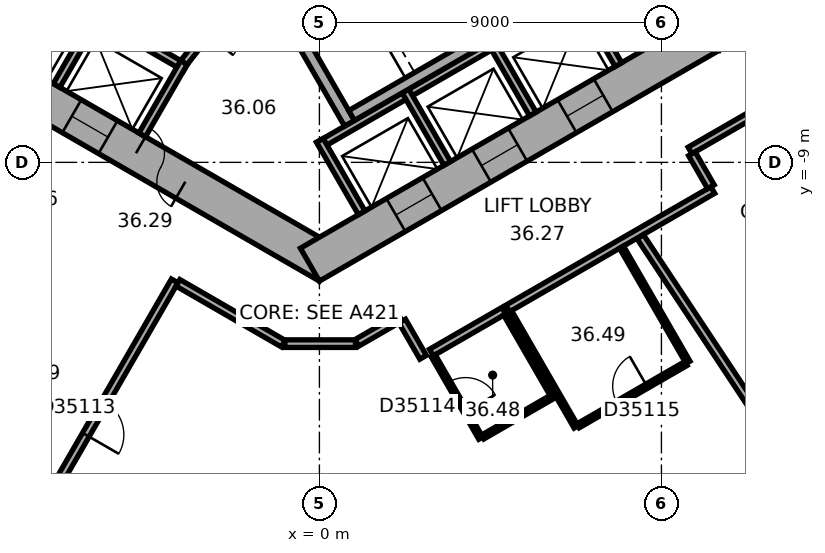
"""IFC4 building model, lengths in metres.
Left out: names, types, materials, properties, quantities, classifications, styles, units other than length and angle.
Written with IfcOpenShell. Run it as: python <this file> out.ifc"""

import sys

from ifc_helpers import new_model, si_unit, direction, frame, frame_2d, origin, place, context, subcontext, project, spatial, rectangle, extrude, element, fill, save


model = new_model("IFC4")
c1 = context("Model", 3, precision=1e-05, world=origin(), true_north=direction((0.0, 1.0)))
c2 = subcontext(c1, "Body", "Model", "MODEL_VIEW")
j1 = project(units=[si_unit("LENGTHUNIT", "METRE"), si_unit("PLANEANGLEUNIT", "RADIAN")], contexts=[c1])
p1 = place(None, origin())
s1 = spatial("IfcSite", under=j1, at=p1, CompositionType="ELEMENT")
p2 = place(p1, origin())
s2 = spatial("IfcBuilding", under=s1, at=p2, CompositionType="ELEMENT")
p3 = place(p2, frame((0.0, 0.0, 150.3)))
s3 = spatial("IfcBuildingStorey", under=s2, at=p3, CompositionType="ELEMENT", Elevation=150.3)
p4 = place(p3, frame((-10.25, -5.629, 0.0), z_axis=(0.0, 0.0, 1.0), x_axis=(0.866022616891, -0.50000482701, 0.0)))
e1 = element("IfcWall", 1, at=p4, inside=s3, PredefinedType="SHEAR", context=c2, shape_type="SweptSolid", body=[
    extrude(rectangle(XDim=12.125, YDim=1.0, at=frame_2d((6.062, 0.0))), origin(), (0.0, 0.0, 1.0), 3.7),
])
p5 = place(p4, frame((6.262, 0.0, 0.0)))
e2 = element("IfcOpeningElement", 2, at=p5, cuts=e1, PredefinedType="OPENING", context=c2, shape_type="SweptSolid", body=[
    extrude(rectangle(XDim=1.5, YDim=2.1, at=frame_2d((0.75, 1.05))), frame((0.0, 0.51, 0.0), z_axis=(0.0, -1.0, 0.0), x_axis=(1.0, 0.0, 0.0)), (0.0, 0.0, 1.0), 1.02),
])
p6 = place(p4, frame((1.712, 0.0, 0.0)))
e3 = element("IfcOpeningElement", 3, at=p6, cuts=e1, PredefinedType="OPENING", context=c2, shape_type="SweptSolid", body=[
    extrude(rectangle(XDim=1.1, YDim=2.1, at=frame_2d((0.55, 1.05))), frame((0.0, 0.51, 0.0), z_axis=(0.0, -1.0, 0.0), x_axis=(1.0, 0.0, 0.0)), (0.0, 0.0, 1.0), 1.02),
])
p7 = place(p4, frame((4.312, 0.0, 0.0)))
e4 = element("IfcOpeningElement", 4, at=p7, cuts=e1, PredefinedType="OPENING", context=c2, shape_type="SweptSolid", body=[
    extrude(rectangle(XDim=1.1, YDim=2.1, at=frame_2d((0.55, 1.05))), frame((0.0, 0.51, 0.0), z_axis=(0.0, -1.0, 0.0), x_axis=(1.0, 0.0, 0.0)), (0.0, 0.0, 1.0), 1.02),
])
p8 = place(p3, frame((-0.25, -11.691, 0.0), z_axis=(0.0, 0.0, 1.0), x_axis=(0.866022616891, 0.50000482701, 0.0)))
e5 = element("IfcWall", 5, at=p8, inside=s3, PredefinedType="SHEAR", context=c2, shape_type="SweptSolid", body=[
    extrude(rectangle(XDim=12.125, YDim=1.0, at=frame_2d((6.062, 0.0))), origin(), (0.0, 0.0, 1.0), 3.7),
])
p9 = place(p8, frame((2.612, 0.0, 0.0)))
e6 = element("IfcOpeningElement", 6, at=p9, cuts=e5, PredefinedType="OPENING", context=c2, shape_type="SweptSolid", body=[
    extrude(rectangle(XDim=1.1, YDim=2.1, at=frame_2d((0.55, 1.05))), frame((0.0, 0.51, 0.0), z_axis=(0.0, -1.0, 0.0), x_axis=(1.0, 0.0, 0.0)), (0.0, 0.0, 1.0), 1.02),
])
p10 = place(p8, frame((5.212, 0.0, 0.0)))
e7 = element("IfcOpeningElement", 7, at=p10, cuts=e5, PredefinedType="OPENING", context=c2, shape_type="SweptSolid", body=[
    extrude(rectangle(XDim=1.1, YDim=2.1, at=frame_2d((0.55, 1.05))), frame((0.0, 0.51, 0.0), z_axis=(0.0, -1.0, 0.0), x_axis=(1.0, 0.0, 0.0)), (0.0, 0.0, 1.0), 1.02),
])
p11 = place(p8, frame((7.812, 0.0, 0.0)))
e8 = element("IfcOpeningElement", 8, at=p11, cuts=e5, PredefinedType="OPENING", context=c2, shape_type="SweptSolid", body=[
    extrude(rectangle(XDim=1.1, YDim=2.1, at=frame_2d((0.55, 1.05))), frame((0.0, 0.51, 0.0), z_axis=(0.0, -1.0, 0.0), x_axis=(1.0, 0.0, 0.0)), (0.0, 0.0, 1.0), 1.02),
])
p12 = place(p3, frame((-18.789, -14.267, 0.0), z_axis=(0.0, 0.0, 1.0), x_axis=(0.866023315909, -0.500003616288, 0.0)))
e9 = element("IfcWall", 9, at=p12, inside=s3, PredefinedType="STANDARD", context=c2, shape_type="SweptSolid", body=[
    extrude(rectangle(XDim=20.044, YDim=0.2, at=frame_2d((10.022, 0.0))), origin(), (0.0, 0.0, 1.0), 3.7),
])
p13 = place(p12, frame((1.314, 0.0, 0.9)))
e10 = element("IfcOpeningElement", 10, at=p13, cuts=e9, PredefinedType="OPENING", context=c2, shape_type="SweptSolid", body=[
    extrude(rectangle(XDim=2.4, YDim=2.0, at=frame_2d((1.2, 1.0))), frame((0.0, 0.11, 0.0), z_axis=(0.0, -1.0, 0.0), x_axis=(1.0, 0.0, 0.0)), (0.0, 0.0, 1.0), 0.22),
])
p14 = place(p12, frame((5.069, 0.0, 0.9)))
e11 = element("IfcOpeningElement", 11, at=p14, cuts=e9, PredefinedType="OPENING", context=c2, shape_type="SweptSolid", body=[
    extrude(rectangle(XDim=2.4, YDim=2.0, at=frame_2d((1.2, 1.0))), frame((0.0, 0.11, 0.0), z_axis=(0.0, -1.0, 0.0), x_axis=(1.0, 0.0, 0.0)), (0.0, 0.0, 1.0), 0.22),
])
p15 = place(p12, frame((8.823, 0.0, 0.9)))
e12 = element("IfcOpeningElement", 12, at=p15, cuts=e9, PredefinedType="OPENING", context=c2, shape_type="SweptSolid", body=[
    extrude(rectangle(XDim=2.4, YDim=2.0, at=frame_2d((1.2, 1.0))), frame((0.0, 0.11, 0.0), z_axis=(0.0, -1.0, 0.0), x_axis=(1.0, 0.0, 0.0)), (0.0, 0.0, 1.0), 0.22),
])
p16 = place(p12, frame((12.577, 0.0, 0.9)))
e13 = element("IfcOpeningElement", 13, at=p16, cuts=e9, PredefinedType="OPENING", context=c2, shape_type="SweptSolid", body=[
    extrude(rectangle(XDim=2.4, YDim=2.0, at=frame_2d((1.2, 1.0))), frame((0.0, 0.11, 0.0), z_axis=(0.0, -1.0, 0.0), x_axis=(1.0, 0.0, 0.0)), (0.0, 0.0, 1.0), 0.22),
])
p17 = place(p12, frame((16.331, 0.0, 0.9)))
e14 = element("IfcOpeningElement", 14, at=p17, cuts=e9, PredefinedType="OPENING", context=c2, shape_type="SweptSolid", body=[
    extrude(rectangle(XDim=2.4, YDim=2.0, at=frame_2d((1.2, 1.0))), frame((0.0, 0.11, 0.0), z_axis=(0.0, -1.0, 0.0), x_axis=(1.0, 0.0, 0.0)), (0.0, 0.0, 1.0), 0.22),
])
p18 = place(p3, frame((2.911, -24.156, 0.0), z_axis=(0.0, 0.0, 1.0), x_axis=(0.833882163564, 0.551942512668, 0.0)))
e15 = element("IfcWall", 15, at=p18, inside=s3, PredefinedType="STANDARD", context=c2, shape_type="SweptSolid", body=[
    extrude(rectangle(XDim=20.044, YDim=0.2, at=frame_2d((10.022, 0.0))), origin(), (0.0, 0.0, 1.0), 3.7),
])
p19 = place(p18, frame((1.313, 0.0, 0.9)))
e16 = element("IfcOpeningElement", 16, at=p19, cuts=e15, PredefinedType="OPENING", context=c2, shape_type="SweptSolid", body=[
    extrude(rectangle(XDim=2.4, YDim=2.0, at=frame_2d((1.2, 1.0))), frame((0.0, 0.11, 0.0), z_axis=(0.0, -1.0, 0.0), x_axis=(1.0, 0.0, 0.0)), (0.0, 0.0, 1.0), 0.22),
])
p20 = place(p18, frame((5.067, 0.0, 0.9)))
e17 = element("IfcOpeningElement", 17, at=p20, cuts=e15, PredefinedType="OPENING", context=c2, shape_type="SweptSolid", body=[
    extrude(rectangle(XDim=2.4, YDim=2.0, at=frame_2d((1.2, 1.0))), frame((0.0, 0.11, 0.0), z_axis=(0.0, -1.0, 0.0), x_axis=(1.0, 0.0, 0.0)), (0.0, 0.0, 1.0), 0.22),
])
p21 = place(p18, frame((8.821, 0.0, 0.9)))
e18 = element("IfcOpeningElement", 18, at=p21, cuts=e15, PredefinedType="OPENING", context=c2, shape_type="SweptSolid", body=[
    extrude(rectangle(XDim=2.4, YDim=2.0, at=frame_2d((1.2, 1.0))), frame((0.0, 0.11, 0.0), z_axis=(0.0, -1.0, 0.0), x_axis=(1.0, 0.0, 0.0)), (0.0, 0.0, 1.0), 0.22),
])
p22 = place(p18, frame((12.575, 0.0, 0.9)))
e19 = element("IfcOpeningElement", 19, at=p22, cuts=e15, PredefinedType="OPENING", context=c2, shape_type="SweptSolid", body=[
    extrude(rectangle(XDim=2.4, YDim=2.0, at=frame_2d((1.2, 1.0))), frame((0.0, 0.11, 0.0), z_axis=(0.0, -1.0, 0.0), x_axis=(1.0, 0.0, 0.0)), (0.0, 0.0, 1.0), 0.22),
])
p23 = place(p18, frame((16.329, 0.0, 0.9)))
e20 = element("IfcOpeningElement", 20, at=p23, cuts=e15, PredefinedType="OPENING", context=c2, shape_type="SweptSolid", body=[
    extrude(rectangle(XDim=2.4, YDim=2.0, at=frame_2d((1.2, 1.0))), frame((0.0, 0.11, 0.0), z_axis=(0.0, -1.0, 0.0), x_axis=(1.0, 0.0, 0.0)), (0.0, 0.0, 1.0), 0.22),
])
p24 = place(p3, frame((-8.203, -3.809, 0.0), z_axis=(0.0, 0.0, 1.0), x_axis=(0.866028230842, -0.499995103361, 0.0)))
e21 = element("IfcWall", 21, at=p24, inside=s3, PredefinedType="PARTITIONING", context=c2, shape_type="SweptSolid", body=[
    extrude(rectangle(XDim=5.4, YDim=0.2, at=frame_2d((2.7, 0.0))), origin(), (0.0, 0.0, 1.0), 3.42),
])
p25 = place(p3, frame((-5.815, -5.072, 0.0), z_axis=(0.0, 0.0, 1.0), x_axis=(-0.499946605688, -0.86605622881, 0.0)))
e22 = element("IfcWall", 22, at=p25, inside=s3, PredefinedType="PARTITIONING", context=c2, shape_type="SweptSolid", body=[
    extrude(rectangle(XDim=2.2, YDim=0.2, at=frame_2d((1.1, 0.0))), origin(), (0.0, 0.0, 1.0), 3.42),
])
p26 = place(p3, frame((-3.563, -6.372, 0.0), z_axis=(0.0, 0.0, 1.0), x_axis=(-0.499994660107, -0.866028486751, 0.0)))
e23 = element("IfcWall", 23, at=p26, inside=s3, PredefinedType="PARTITIONING", context=c2, shape_type="SweptSolid", body=[
    extrude(rectangle(XDim=2.2, YDim=0.2, at=frame_2d((1.1, 0.0))), origin(), (0.0, 0.0, 1.0), 3.42),
])
p27 = place(p3, frame((-0.024, -8.559, 0.0), z_axis=(0.0, 0.0, 1.0), x_axis=(0.866026010844, 0.49999894854, 0.0)))
e24 = element("IfcWall", 24, at=p27, inside=s3, PredefinedType="PARTITIONING", context=c2, shape_type="SweptSolid", body=[
    extrude(rectangle(XDim=8.0, YDim=0.2, at=frame_2d((4.0, 0.0))), origin(), (0.0, 0.0, 1.0), 3.42),
])
for number, where, z_axis, x_axis in (
    (25, (0.013, -8.422, 0.0), (0.0, 0.0, 1.0), (0.5, -0.866, 0.0)),
    (26, (2.264, -7.122, 0.0), (0.0, 0.0, 1.0), (0.5, -0.866, 0.0)),
    (27, (4.516, -5.822, 0.0), (0.0, 0.0, 1.0), (0.5, -0.866, 0.0)),
    (28, (6.768, -4.522, 0.0), (0.0, 0.0, 1.0), (0.5, -0.866, 0.0)),
):
    element("IfcWall", number, at=place(p3, frame(where, z_axis=z_axis, x_axis=x_axis)), inside=s3, PredefinedType="PARTITIONING", context=c2, shape_type="SweptSolid", body=[
        extrude(rectangle(XDim=2.2, YDim=0.2, at=frame_2d((1.1, 0.0))), origin(), (0.0, 0.0, 1.0), 3.42),
    ])
p28 = place(p3, frame((-1.558, -3.902, 0.0), z_axis=(0.0, 0.0, 1.0), x_axis=(0.499977259774, -0.866038532462, 0.0)))
e29 = element("IfcWall", 29, at=p28, inside=s3, PredefinedType="SHEAR", context=c2, shape_type="SweptSolid", body=[
    extrude(rectangle(XDim=4.7, YDim=0.3, at=frame_2d((2.35, 0.0))), origin(), (0.0, 0.0, 1.0), 3.42),
])
p29 = place(p28, frame((0.8, 0.0, 0.0)))
e30 = element("IfcOpeningElement", 30, at=p29, cuts=e29, PredefinedType="OPENING", context=c2, shape_type="SweptSolid", body=[
    extrude(rectangle(XDim=1.2, YDim=2.1, at=frame_2d((0.6, 1.05))), frame((0.0, 0.16, 0.0), z_axis=(0.0, -1.0, 0.0), x_axis=(1.0, 0.0, 0.0)), (0.0, 0.0, 1.0), 0.32),
])
p30 = place(p3, frame((0.847, -7.767, 0.0), z_axis=(0.0, 0.0, 1.0), x_axis=(0.866027801685, 0.499995846692, 0.0)))
e31 = element("IfcWall", 31, at=p30, inside=s3, PredefinedType="SHEAR", context=c2, shape_type="SweptSolid", body=[
    extrude(rectangle(XDim=7.06, YDim=0.3, at=frame_2d((3.53, 0.0))), origin(), (0.0, 0.0, 1.0), 3.42),
])
p31 = place(p3, frame((-1.712, -4.008, 0.0), z_axis=(0.0, 0.0, 1.0), x_axis=(-0.616549420702, -0.787316208287, 0.0)))
e32 = element("IfcWall", 32, at=p31, inside=s3, PredefinedType="PARTITIONING", context=c2, shape_type="SweptSolid", body=[
    extrude(rectangle(XDim=3.002, YDim=0.2, at=frame_2d((1.501, 0.0))), origin(), (0.0, 0.0, 1.0), 3.42),
])
p32 = place(p31, frame((1.15, 0.0, 0.0)))
e33 = element("IfcOpeningElement", 33, at=p32, cuts=e32, PredefinedType="OPENING", context=c2, shape_type="SweptSolid", body=[
    extrude(rectangle(XDim=0.9, YDim=2.1, at=frame_2d((0.45, 1.05))), frame((0.0, 0.11, 0.0), z_axis=(0.0, -1.0, 0.0), x_axis=(1.0, 0.0, 0.0)), (0.0, 0.0, 1.0), 0.22),
])
p33 = place(p3, frame((-7.984, -19.351, 0.0), z_axis=(0.0, 0.0, 1.0), x_axis=(0.500010139422, 0.866019549707, 0.0)))
e34 = element("IfcWall", 34, at=p33, inside=s3, PredefinedType="PARTITIONING", context=c2, shape_type="SweptSolid", body=[
    extrude(rectangle(XDim=8.35, YDim=0.2, at=frame_2d((4.175, 0.0))), origin(), (0.0, 0.0, 1.0), 3.42),
])
p34 = place(p33, frame((3.675, 0.0, 0.0)))
e35 = element("IfcOpeningElement", 35, at=p34, cuts=e34, PredefinedType="OPENING", context=c2, shape_type="SweptSolid", body=[
    extrude(rectangle(XDim=1.0, YDim=2.1, at=frame_2d((0.5, 1.05))), frame((0.0, 0.11, 0.0), z_axis=(0.0, -1.0, 0.0), x_axis=(1.0, 0.0, 0.0)), (0.0, 0.0, 1.0), 0.22),
])
p35 = place(p3, frame((-3.722, -12.169, 0.0), z_axis=(0.0, 0.0, 1.0), x_axis=(0.866033163891, -0.499986558861, 0.0)))
e36 = element("IfcWall", 36, at=p35, inside=s3, PredefinedType="PARTITIONING", context=c2, shape_type="SweptSolid", body=[
    extrude(rectangle(XDim=3.201, YDim=0.2, at=frame_2d((1.6, 0.0))), origin(), (0.0, 0.0, 1.0), 3.42),
])
p36 = place(p3, frame((-0.91, -13.77, 0.0), z_axis=(0.0, 0.0, 1.0), x_axis=(1.0, 0.0, 0.0)))
e37 = element("IfcWall", 37, at=p36, inside=s3, PredefinedType="PARTITIONING", context=c2, shape_type="SweptSolid", body=[
    extrude(rectangle(XDim=1.86, YDim=0.2, at=frame_2d((0.93, 0.0))), origin(), (0.0, 0.0, 1.0), 3.42),
])
p37 = place(p3, frame((0.985, -13.75, 0.0), z_axis=(0.0, 0.0, 1.0), x_axis=(0.866028661061, 0.499994358189, 0.0)))
e38 = element("IfcWall", 38, at=p37, inside=s3, PredefinedType="PARTITIONING", context=c2, shape_type="SweptSolid", body=[
    extrude(rectangle(XDim=1.321, YDim=0.2, at=frame_2d((0.661, 0.0))), origin(), (0.0, 0.0, 1.0), 3.42),
])
p38 = place(p3, frame((2.179, -13.176, 0.0), z_axis=(0.0, 0.0, 1.0), x_axis=(0.499978356969, -0.866037899034, 0.0)))
e39 = element("IfcWall", 39, at=p38, inside=s3, PredefinedType="PARTITIONING", context=c2, shape_type="SweptSolid", body=[
    extrude(rectangle(XDim=1.101, YDim=0.2, at=frame_2d((0.551, 0.0))), origin(), (0.0, 0.0, 1.0), 3.42),
])
p39 = place(p3, frame((2.946, -14.004, 0.0), z_axis=(0.0, 0.0, 1.0), x_axis=(0.866008176907, 0.50002983664, 0.0)))
e40 = element("IfcWall", 40, at=p39, inside=s3, PredefinedType="PARTITIONING", context=c2, shape_type="SweptSolid", body=[
    extrude(rectangle(XDim=2.2, YDim=0.2, at=frame_2d((1.1, 0.0))), origin(), (0.0, 0.0, 1.0), 3.42),
])
p40 = place(p3, frame((4.246, -16.256, 0.0), z_axis=(0.0, 0.0, 1.0), x_axis=(-0.499961950354, 0.866047370643, 0.0)))
e41 = element("IfcWall", 41, at=p40, inside=s3, PredefinedType="PARTITIONING", context=c2, shape_type="SweptSolid", body=[
    extrude(rectangle(XDim=2.5, YDim=0.12, at=frame_2d((1.25, 0.0))), origin(), (0.0, 0.0, 1.0), 3.42),
])
p41 = place(p40, frame((0.8, 0.0, 0.0)))
e42 = element("IfcOpeningElement", 42, at=p41, cuts=e41, PredefinedType="OPENING", context=c2, shape_type="SweptSolid", body=[
    extrude(rectangle(XDim=0.9, YDim=2.1, at=frame_2d((0.45, 1.05))), frame((0.0, 0.07, 0.0), z_axis=(0.0, -1.0, 0.0), x_axis=(1.0, 0.0, 0.0)), (0.0, 0.0, 1.0), 0.14),
])
p42 = place(p3, frame((4.901, -12.991, 0.0), z_axis=(0.0, 0.0, 1.0), x_axis=(0.500004234368, -0.866022959057, 0.0)))
e43 = element("IfcWall", 43, at=p42, inside=s3, PredefinedType="PARTITIONING", context=c2, shape_type="SweptSolid", body=[
    extrude(rectangle(XDim=2.5, YDim=0.12, at=frame_2d((1.25, 0.0))), origin(), (0.0, 0.0, 1.0), 3.42),
])
p43 = place(p3, frame((4.955, -12.844, 0.0), z_axis=(0.0, 0.0, 1.0), x_axis=(0.86602379309, 0.500002789795, 0.0)))
e44 = element("IfcWall", 44, at=p43, inside=s3, PredefinedType="PARTITIONING", context=c2, shape_type="SweptSolid", body=[
    extrude(rectangle(XDim=6.232, YDim=0.2, at=frame_2d((3.116, 0.0))), origin(), (0.0, 0.0, 1.0), 3.42),
])
p44 = place(p3, frame((6.099, -15.186, 0.0), z_axis=(0.0, 0.0, 1.0), x_axis=(-0.866009661879, -0.500027264788, 0.0)))
e45 = element("IfcWall", 45, at=p44, inside=s3, PredefinedType="PARTITIONING", context=c2, shape_type="SweptSolid", body=[
    extrude(rectangle(XDim=2.08, YDim=0.12, at=frame_2d((1.04, 0.0))), origin(), (0.0, 0.0, 1.0), 3.42),
])
for number, where, z_axis, x_axis in (
    (46, (6.755, -15.962, 0.0), (0.0, 0.0, 1.0), (-0.5, 0.866, 0.0)),
    (47, (7.949, -11.231, 0.0), (0.0, 0.0, 1.0), (0.5, -0.866, 0.0)),
):
    element("IfcWall", number, at=place(p3, frame(where, z_axis=z_axis, x_axis=x_axis)), inside=s3, PredefinedType="PARTITIONING", context=c2, shape_type="SweptSolid", body=[
        extrude(rectangle(XDim=3.5, YDim=0.12, at=frame_2d((1.75, 0.0))), origin(), (0.0, 0.0, 1.0), 3.42),
    ])
p45 = place(p3, frame((9.647, -14.292, 0.0), z_axis=(0.0, 0.0, 1.0), x_axis=(-0.866040564224, -0.499973740429, 0.0)))
e48 = element("IfcWall", 48, at=p45, inside=s3, PredefinedType="PARTITIONING", context=c2, shape_type="SweptSolid", body=[
    extrude(rectangle(XDim=3.28, YDim=0.12, at=frame_2d((1.64, 0.0))), origin(), (0.0, 0.0, 1.0), 3.42),
])
p46 = place(p45, frame((1.19, 0.0, 0.0)))
e49 = element("IfcOpeningElement", 49, at=p46, cuts=e48, PredefinedType="OPENING", context=c2, shape_type="SweptSolid", body=[
    extrude(rectangle(XDim=0.9, YDim=2.1, at=frame_2d((0.45, 1.05))), frame((0.0, 0.07, 0.0), z_axis=(0.0, -1.0, 0.0), x_axis=(1.0, 0.0, 0.0)), (0.0, 0.0, 1.0), 0.14),
])
p47 = place(p3, frame((9.752, -8.688, 0.0), z_axis=(0.0, 0.0, 1.0), x_axis=(0.865974105138, 0.500088841337, 0.0)))
e50 = element("IfcWall", 50, at=p47, inside=s3, PredefinedType="PARTITIONING", context=c2, shape_type="SweptSolid", body=[
    extrude(rectangle(XDim=1.961, YDim=0.2, at=frame_2d((0.98, 0.0))), origin(), (0.0, 0.0, 1.0), 3.42),
])
p48 = place(p3, frame((10.302, -9.642, 0.0), z_axis=(0.0, 0.0, 1.0), x_axis=(-0.500074377092, 0.865982457891, 0.0)))
e51 = element("IfcWall", 51, at=p48, inside=s3, PredefinedType="PARTITIONING", context=c2, shape_type="SweptSolid", body=[
    extrude(rectangle(XDim=1.001, YDim=0.2, at=frame_2d((0.5, 0.0))), origin(), (0.0, 0.0, 1.0), 3.42),
])
p49 = place(p3, frame((12.281, -16.755, 0.0), z_axis=(0.0, 0.0, 1.0), x_axis=(-0.551925794663, 0.833893228888, 0.0)))
e52 = element("IfcWall", 52, at=p49, inside=s3, PredefinedType="PARTITIONING", context=c2, shape_type="SweptSolid", body=[
    extrude(rectangle(XDim=6.953, YDim=0.2, at=frame_2d((3.476, 0.0))), origin(), (0.0, 0.0, 1.0), 3.42),
])
p50 = place(p5, origin())
e53 = element("IfcDoor", 53, at=p50, inside=s3, OperationType="DOUBLE_DOOR_SINGLE_SWING", PredefinedType="DOOR", context=c2, shape_type="SweptSolid", body=[
    extrude(rectangle(XDim=1.5, YDim=2.1, at=frame_2d((0.75, 1.05))), frame((0.0, 0.025, 0.0), z_axis=(0.0, -1.0, 0.0), x_axis=(1.0, 0.0, 0.0)), (0.0, 0.0, 1.0), 0.05),
])
fill(e2, e53)
p51 = place(p7, origin())
e54 = element("IfcDoor", 54, at=p51, inside=s3, OperationType="DOUBLE_DOOR_SLIDING", PredefinedType="DOOR", context=c2, shape_type="SweptSolid", body=[
    extrude(rectangle(XDim=1.1, YDim=2.1, at=frame_2d((0.55, 1.05))), frame((0.0, 0.025, 0.0), z_axis=(0.0, -1.0, 0.0), x_axis=(1.0, 0.0, 0.0)), (0.0, 0.0, 1.0), 0.05),
])
fill(e4, e54)
p52 = place(p9, origin())
e55 = element("IfcDoor", 55, at=p52, inside=s3, OperationType="DOUBLE_DOOR_SLIDING", PredefinedType="DOOR", context=c2, shape_type="SweptSolid", body=[
    extrude(rectangle(XDim=1.1, YDim=2.1, at=frame_2d((0.55, 1.05))), frame((0.0, 0.025, 0.0), z_axis=(0.0, -1.0, 0.0), x_axis=(1.0, 0.0, 0.0)), (0.0, 0.0, 1.0), 0.05),
])
fill(e6, e55)
p53 = place(p10, origin())
e56 = element("IfcDoor", 56, at=p53, inside=s3, OperationType="DOUBLE_DOOR_SLIDING", PredefinedType="DOOR", context=c2, shape_type="SweptSolid", body=[
    extrude(rectangle(XDim=1.1, YDim=2.1, at=frame_2d((0.55, 1.05))), frame((0.0, 0.025, 0.0), z_axis=(0.0, -1.0, 0.0), x_axis=(1.0, 0.0, 0.0)), (0.0, 0.0, 1.0), 0.05),
])
fill(e7, e56)
p54 = place(p11, origin())
e57 = element("IfcDoor", 57, at=p54, inside=s3, OperationType="DOUBLE_DOOR_SLIDING", PredefinedType="DOOR", context=c2, shape_type="SweptSolid", body=[
    extrude(rectangle(XDim=1.1, YDim=2.1, at=frame_2d((0.55, 1.05))), frame((0.0, 0.025, 0.0), z_axis=(0.0, -1.0, 0.0), x_axis=(1.0, 0.0, 0.0)), (0.0, 0.0, 1.0), 0.05),
])
fill(e8, e57)
p55 = place(p34, origin())
e58 = element("IfcDoor", 58, at=p55, inside=s3, OperationType="SINGLE_SWING_LEFT", PredefinedType="DOOR", context=c2, shape_type="SweptSolid", body=[
    extrude(rectangle(XDim=1.0, YDim=2.1, at=frame_2d((0.5, 1.05))), frame((0.0, 0.025, 0.0), z_axis=(0.0, -1.0, 0.0), x_axis=(1.0, 0.0, 0.0)), (0.0, 0.0, 1.0), 0.05),
])
fill(e35, e58)
p56 = place(p41, origin())
e59 = element("IfcDoor", 59, at=p56, inside=s3, OperationType="SINGLE_SWING_LEFT", PredefinedType="DOOR", context=c2, shape_type="SweptSolid", body=[
    extrude(rectangle(XDim=0.9, YDim=2.1, at=frame_2d((0.45, 1.05))), frame((0.0, 0.025, 0.0), z_axis=(0.0, -1.0, 0.0), x_axis=(1.0, 0.0, 0.0)), (0.0, 0.0, 1.0), 0.05),
])
fill(e42, e59)
p57 = place(p46, origin())
e60 = element("IfcDoor", 60, at=p57, inside=s3, OperationType="SINGLE_SWING_LEFT", PredefinedType="DOOR", context=c2, shape_type="SweptSolid", body=[
    extrude(rectangle(XDim=0.9, YDim=2.1, at=frame_2d((0.45, 1.05))), frame((0.0, 0.025, 0.0), z_axis=(0.0, -1.0, 0.0), x_axis=(1.0, 0.0, 0.0)), (0.0, 0.0, 1.0), 0.05),
])
fill(e49, e60)
save(model, sys.argv[1])
